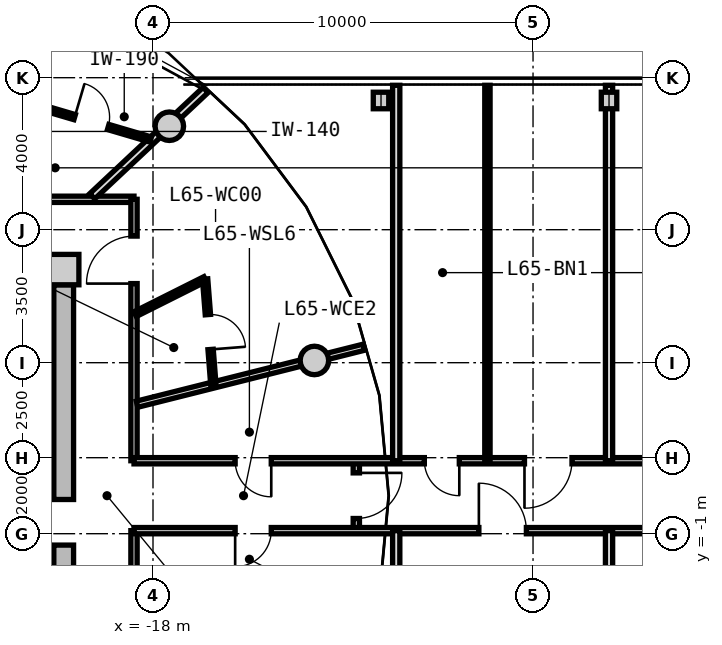
"""IFC4 building model, lengths in metres.
Left out: names, types, materials, properties, quantities, classifications, styles, units other than length and angle.
Written with IfcOpenShell. Run it as: python <this file> out.ifc"""

import sys

from ifc_helpers import new_model, si_unit, direction, frame, frame_2d, origin, origin_2d, place, context, subcontext, project, spatial, rectangle, circle, i_section, extrude, source, transform, mapped, element, fill, save


model = new_model("IFC4")
c1 = context("Model", 3, precision=1e-05, world=origin(), true_north=direction((0.0, 1.0)))
c2 = subcontext(c1, "Body", "Model", "MODEL_VIEW")
j1 = project(units=[si_unit("LENGTHUNIT", "METRE"), si_unit("PLANEANGLEUNIT", "RADIAN")], contexts=[c1])
p1 = place(None, origin())
s1 = spatial("IfcSite", under=j1, at=p1, CompositionType="ELEMENT")
p2 = place(p1, origin())
s2 = spatial("IfcBuilding", under=s1, at=p2, CompositionType="ELEMENT")
p3 = place(p2, frame((0.0, 0.0, 210.85)))
s3 = spatial("IfcBuildingStorey", under=s2, at=p3, CompositionType="ELEMENT", Elevation=210.85)
m1 = source(origin(), c2, "Body", "SweptSolid", [
    extrude(rectangle(XDim=0.8, YDim=0.8, at=origin_2d()), origin(), (0.0, 0.0, 1.0), 3.05),
])
p4 = place(p3, frame((-20.35, 5.95, 0.0), z_axis=(0.0, 0.0, 1.0), x_axis=(1.0, 0.0, 0.0)))
e1 = element("IfcColumn", 1, at=p4, inside=s3, PredefinedType="COLUMN", context=c2, shape_type="MappedRepresentation", body=[
    mapped(m1, transform((0.0, 0.0, 0.0), x_axis=(1.0, 0.0, 0.0), y_axis=(0.0, 1.0, 0.0), z_axis=(0.0, 0.0, 1.0), scale=1.0)),
])
m2 = source(origin(), c2, "Body", "SweptSolid", [
    extrude(rectangle(XDim=11.1, YDim=0.52, at=frame_2d((5.55, 0.0))), origin(), (0.0, 0.0, 1.0), 2.76),
])
p5 = place(p3, frame((-20.35, 5.55, 0.0), z_axis=(0.0, 0.0, 1.0), x_axis=(0.0, -1.0, 0.0)))
e2 = element("IfcWall", 2, at=p5, inside=s3, PredefinedType="SHEAR", context=c2, shape_type="MappedRepresentation", body=[
    mapped(m2, transform((0.0, 0.0, 0.0), x_axis=(1.0, 0.0, 0.0), y_axis=(0.0, 1.0, 0.0), z_axis=(0.0, 0.0, 1.0), scale=1.0)),
])
p6 = place(p5, frame((5.65, 0.0, 0.0)))
e3 = element("IfcOpeningElement", 3, at=p6, cuts=e2, PredefinedType="OPENING", context=c2, shape_type="SweptSolid", body=[
    extrude(rectangle(XDim=1.2, YDim=2.15, at=frame_2d((0.6, 1.075))), frame((0.0, 0.27, 0.0), z_axis=(0.0, -1.0, 0.0), x_axis=(1.0, 0.0, 0.0)), (0.0, 0.0, 1.0), 0.54),
])
p7 = place(p5, frame((9.3, 0.0, 0.0)))
e4 = element("IfcOpeningElement", 4, at=p7, cuts=e2, PredefinedType="OPENING", context=c2, shape_type="SweptSolid", body=[
    extrude(rectangle(XDim=1.0, YDim=2.1, at=frame_2d((0.5, 1.05))), frame((0.0, 0.27, 0.0), z_axis=(0.0, -1.0, 0.0), x_axis=(1.0, 0.0, 0.0)), (0.0, 0.0, 1.0), 0.54),
])
m3 = source(origin(), c2, "Body", "SweptSolid", [
    extrude(circle(Radius=0.375, at=origin_2d()), origin(), (0.0, 0.0, 1.0), 3.05),
])
for number, where, z_axis, x_axis in (
    (5, (-13.753, 3.559, 0.0), (0.0, 0.0, 1.0), (1.0, 0.0, 0.0)),
    (6, (-17.57, 9.723, 0.0), (0.0, 0.0, 1.0), (1.0, 0.0, 0.0)),
):
    element("IfcColumn", number, at=place(p3, frame(where, z_axis=z_axis, x_axis=x_axis)), inside=s3, PredefinedType="COLUMN", context=c2, shape_type="MappedRepresentation", body=[
        mapped(m3, transform((0.0, 0.0, 0.0), x_axis=(1.0, 0.0, 0.0), y_axis=(0.0, 1.0, 0.0), z_axis=(0.0, 0.0, 1.0), scale=1.0)),
    ])
m4 = source(origin(), c2, "Body", "SweptSolid", [
    extrude(i_section(OverallWidth=0.407, OverallDepth=0.435, WebThickness=0.024, FlangeThickness=0.039, FilletRadius=0.015, at=origin_2d()), origin(), (0.0, 0.0, 1.0), 3.05),
])
for number, where, z_axis, x_axis in (
    (7, (-12.0, 10.4, 0.0), (0.0, 0.0, 1.0), (1.0, 0.0, 0.0)),
    (8, (-6.0, 10.4, 0.0), (0.0, 0.0, 1.0), (1.0, 0.0, 0.0)),
):
    element("IfcColumn", number, at=place(p3, frame(where, z_axis=z_axis, x_axis=x_axis)), inside=s3, PredefinedType="COLUMN", context=c2, shape_type="MappedRepresentation", body=[
        mapped(m4, transform((0.0, 0.0, 0.0), x_axis=(1.0, 0.0, 0.0), y_axis=(0.0, 1.0, 0.0), z_axis=(0.0, 0.0, 1.0), scale=1.0)),
    ])
m5 = source(origin(), c2, "Body", "SweptSolid", [
    extrude(rectangle(XDim=8.58, YDim=0.165, at=frame_2d((4.29, 0.0))), origin(), (0.0, 0.0, 1.0), 2.745),
])
p8 = place(p3, frame((-27.08, 7.8, 0.0), z_axis=(0.0, 0.0, 1.0), x_axis=(1.0, 0.0, 0.0)))
e9 = element("IfcWall", 9, at=p8, inside=s3, PredefinedType="PARTITIONING", context=c2, shape_type="MappedRepresentation", body=[
    mapped(m5, transform((0.0, 0.0, 0.0), x_axis=(1.0, 0.0, 0.0), y_axis=(0.0, 1.0, 0.0), z_axis=(0.0, 0.0, 1.0), scale=1.0)),
])
p9 = place(p8, frame((2.18, 0.0, 0.0)))
e10 = element("IfcOpeningElement", 10, at=p9, cuts=e9, PredefinedType="OPENING", context=c2, shape_type="SweptSolid", body=[
    extrude(rectangle(XDim=1.25, YDim=2.2, at=frame_2d((0.625, 1.1))), frame((0.0, 0.093, 0.0), z_axis=(0.0, -1.0, 0.0), x_axis=(1.0, 0.0, 0.0)), (0.0, 0.0, 1.0), 0.185),
])
m6 = source(origin(), c2, "Body", "SweptSolid", [
    extrude(rectangle(XDim=6.88, YDim=0.165, at=frame_2d((3.44, 0.0))), origin(), (0.0, 0.0, 1.0), 2.745),
])
p10 = place(p3, frame((-18.5, 7.8, 0.0), z_axis=(0.0, 0.0, 1.0), x_axis=(0.0, -1.0, 0.0)))
e11 = element("IfcWall", 11, at=p10, inside=s3, PredefinedType="PARTITIONING", context=c2, shape_type="MappedRepresentation", body=[
    mapped(m6, transform((0.0, 0.0, 0.0), x_axis=(1.0, 0.0, 0.0), y_axis=(0.0, 1.0, 0.0), z_axis=(0.0, 0.0, 1.0), scale=1.0)),
])
p11 = place(p10, frame((0.968, 0.0, 0.0)))
e12 = element("IfcOpeningElement", 12, at=p11, cuts=e11, PredefinedType="OPENING", context=c2, shape_type="SweptSolid", body=[
    extrude(rectangle(XDim=1.25, YDim=2.2, at=frame_2d((0.625, 1.1))), frame((0.0, 0.093, 0.0), z_axis=(0.0, -1.0, 0.0), x_axis=(1.0, 0.0, 0.0)), (0.0, 0.0, 1.0), 0.185),
])
p12 = place(p3, frame((-18.5, -0.92, 0.0), z_axis=(0.0, 0.0, 1.0), x_axis=(0.0, -1.0, 0.0)))
e13 = element("IfcWall", 13, at=p12, inside=s3, PredefinedType="PARTITIONING", context=c2, shape_type="MappedRepresentation", body=[
    mapped(m6, transform((0.0, 0.0, 0.0), x_axis=(1.0, 0.0, 0.0), y_axis=(0.0, 1.0, 0.0), z_axis=(0.0, 0.0, 1.0), scale=1.0)),
])
p13 = place(p12, frame((3.464, 0.0, 0.0)))
e14 = element("IfcOpeningElement", 14, at=p13, cuts=e13, PredefinedType="OPENING", context=c2, shape_type="SweptSolid", body=[
    extrude(rectangle(XDim=1.25, YDim=2.2, at=frame_2d((0.625, 1.1))), frame((0.0, 0.093, 0.0), z_axis=(0.0, -1.0, 0.0), x_axis=(1.0, 0.0, 0.0)), (0.0, 0.0, 1.0), 0.185),
])
m7 = source(origin(), c2, "Body", "SweptSolid", [
    extrude(rectangle(XDim=6.157, YDim=0.165, at=frame_2d((3.079, 0.0))), origin(), (0.0, 0.0, 1.0), 2.345),
])
p14 = place(p3, frame((-18.42, 2.407, 0.0), z_axis=(0.0, 0.0, 1.0), x_axis=(0.969840867184, 0.243738984038, 0.0)))
e15 = element("IfcWall", 15, at=p14, inside=s3, PredefinedType="PARTITIONING", context=c2, shape_type="MappedRepresentation", body=[
    mapped(m7, transform((0.0, 0.0, 0.0), x_axis=(1.0, 0.0, 0.0), y_axis=(0.0, 1.0, 0.0), z_axis=(0.0, 0.0, 1.0), scale=1.0)),
])
m8 = source(origin(), c2, "Body", "SweptSolid", [
    extrude(rectangle(XDim=4.089, YDim=0.19, at=frame_2d((2.044, 0.0))), origin(), (0.0, 0.0, 1.0), 2.345),
])
p15 = place(p3, frame((-19.598, 7.88, 0.0), z_axis=(0.0, 0.0, 1.0), x_axis=(0.729401273609, 0.684086092577, 0.0)))
e16 = element("IfcWall", 16, at=p15, inside=s3, PredefinedType="PARTITIONING", context=c2, shape_type="MappedRepresentation", body=[
    mapped(m8, transform((0.0, 0.0, 0.0), x_axis=(1.0, 0.0, 0.0), y_axis=(0.0, 1.0, 0.0), z_axis=(0.0, 0.0, 1.0), scale=1.0)),
])
m9 = source(origin(), c2, "Body", "SweptSolid", [
    extrude(rectangle(XDim=2.06, YDim=0.14, at=frame_2d((1.03, 0.0))), origin(), (0.0, 0.0, 1.0), 2.745),
])
p16 = place(p3, frame((-18.47, 4.778, 0.0), z_axis=(0.0, 0.0, 1.0), x_axis=(0.893952568722, 0.448161583444, 0.0)))
e17 = element("IfcWall", 17, at=p16, inside=s3, PredefinedType="PARTITIONING", context=c2, shape_type="MappedRepresentation", body=[
    mapped(m9, transform((0.0, 0.0, 0.0), x_axis=(1.0, 0.0, 0.0), y_axis=(0.0, 1.0, 0.0), z_axis=(0.0, 0.0, 1.0), scale=1.0)),
])
m10 = source(origin(), c2, "Body", "SweptSolid", [
    extrude(rectangle(XDim=2.798, YDim=0.14, at=frame_2d((1.399, 0.0))), origin(), (0.0, 0.0, 1.0), 2.745),
])
p17 = place(p3, frame((-16.629, 5.701, 0.0), z_axis=(0.0, 0.0, 1.0), x_axis=(0.077823984089, -0.996967114553, 0.0)))
e18 = element("IfcWall", 18, at=p17, inside=s3, PredefinedType="PARTITIONING", context=c2, shape_type="MappedRepresentation", body=[
    mapped(m10, transform((0.0, 0.0, 0.0), x_axis=(1.0, 0.0, 0.0), y_axis=(0.0, 1.0, 0.0), z_axis=(0.0, 0.0, 1.0), scale=1.0)),
])
p18 = place(p17, frame((0.939, 0.0, 0.0)))
e19 = element("IfcOpeningElement", 19, at=p18, cuts=e18, PredefinedType="OPENING", context=c2, shape_type="SweptSolid", body=[
    extrude(rectangle(XDim=0.92, YDim=2.1, at=frame_2d((0.46, 1.05))), frame((0.0, 0.08, 0.0), z_axis=(0.0, -1.0, 0.0), x_axis=(1.0, 0.0, 0.0)), (0.0, 0.0, 1.0), 0.16),
])
m11 = source(origin(), c2, "Body", "SweptSolid", [
    extrude(rectangle(XDim=3.252, YDim=0.14, at=frame_2d((1.626, 0.0))), origin(), (0.0, 0.0, 1.0), 2.745),
])
p19 = place(p3, frame((-21.18, 10.291, 0.0), z_axis=(0.0, 0.0, 1.0), x_axis=(0.959294945864, -0.282406102695, 0.0)))
e20 = element("IfcWall", 20, at=p19, inside=s3, PredefinedType="PARTITIONING", context=c2, shape_type="MappedRepresentation", body=[
    mapped(m11, transform((0.0, 0.0, 0.0), x_axis=(1.0, 0.0, 0.0), y_axis=(0.0, 1.0, 0.0), z_axis=(0.0, 0.0, 1.0), scale=1.0)),
])
p20 = place(p19, frame((1.166, 0.0, 0.0)))
e21 = element("IfcOpeningElement", 21, at=p20, cuts=e20, PredefinedType="OPENING", context=c2, shape_type="SweptSolid", body=[
    extrude(rectangle(XDim=0.92, YDim=2.1, at=frame_2d((0.46, 1.05))), frame((0.0, 0.08, 0.0), z_axis=(0.0, -1.0, 0.0), x_axis=(1.0, 0.0, 0.0)), (0.0, 0.0, 1.0), 0.16),
])
m12 = source(origin(), c2, "Body", "SweptSolid", [
    extrude(rectangle(XDim=1.84, YDim=0.165, at=frame_2d((0.92, 0.0))), origin(), (0.0, 0.0, 1.0), 2.745),
])
p21 = place(p3, frame((-12.65, -0.92, 0.0), z_axis=(0.0, 0.0, 1.0), x_axis=(0.0, 1.0, 0.0)))
e22 = element("IfcWall", 22, at=p21, inside=s3, PredefinedType="PARTITIONING", context=c2, shape_type="MappedRepresentation", body=[
    mapped(m12, transform((0.0, 0.0, 0.0), x_axis=(1.0, 0.0, 0.0), y_axis=(0.0, 1.0, 0.0), z_axis=(0.0, 0.0, 1.0), scale=1.0)),
])
p22 = place(p21, frame((0.32, 0.0, 0.0)))
e23 = element("IfcOpeningElement", 23, at=p22, cuts=e22, PredefinedType="OPENING", context=c2, shape_type="SweptSolid", body=[
    extrude(rectangle(XDim=1.2, YDim=2.15, at=frame_2d((0.6, 1.075))), frame((0.0, 0.093, 0.0), z_axis=(0.0, -1.0, 0.0), x_axis=(1.0, 0.0, 0.0)), (0.0, 0.0, 1.0), 0.185),
])
m13 = source(origin(), c2, "Body", "SweptSolid", [
    extrude(rectangle(XDim=37.0, YDim=0.165, at=frame_2d((18.5, 0.0))), origin(), (0.0, 0.0, 1.0), 2.745),
])
p23 = place(p3, frame((-18.5, -0.92, 0.0), z_axis=(0.0, 0.0, 1.0), x_axis=(1.0, 0.0, 0.0)))
e24 = element("IfcWall", 24, at=p23, inside=s3, PredefinedType="PARTITIONING", context=c2, shape_type="MappedRepresentation", body=[
    mapped(m13, transform((0.0, 0.0, 0.0), x_axis=(1.0, 0.0, 0.0), y_axis=(0.0, 1.0, 0.0), z_axis=(0.0, 0.0, 1.0), scale=1.0)),
])
p24 = place(p23, frame((2.662, 0.0, 0.0)))
e25 = element("IfcOpeningElement", 25, at=p24, cuts=e24, PredefinedType="OPENING", context=c2, shape_type="SweptSolid", body=[
    extrude(rectangle(XDim=0.95, YDim=2.1, at=frame_2d((0.475, 1.05))), frame((0.0, 0.093, 0.0), z_axis=(0.0, -1.0, 0.0), x_axis=(1.0, 0.0, 0.0)), (0.0, 0.0, 1.0), 0.185),
])
p25 = place(p23, frame((33.388, 0.0, 0.0)))
e26 = element("IfcOpeningElement", 26, at=p25, cuts=e24, PredefinedType="OPENING", context=c2, shape_type="SweptSolid", body=[
    extrude(rectangle(XDim=0.95, YDim=2.1, at=frame_2d((0.475, 1.05))), frame((0.0, 0.093, 0.0), z_axis=(0.0, -1.0, 0.0), x_axis=(1.0, 0.0, 0.0)), (0.0, 0.0, 1.0), 0.185),
])
p26 = place(p23, frame((9.075, 0.0, 0.0)))
e27 = element("IfcOpeningElement", 27, at=p26, cuts=e24, PredefinedType="OPENING", context=c2, shape_type="SweptSolid", body=[
    extrude(rectangle(XDim=1.25, YDim=2.2, at=frame_2d((0.625, 1.1))), frame((0.0, 0.093, 0.0), z_axis=(0.0, -1.0, 0.0), x_axis=(1.0, 0.0, 0.0)), (0.0, 0.0, 1.0), 0.185),
])
p27 = place(p23, frame((14.875, 0.0, 0.0)))
e28 = element("IfcOpeningElement", 28, at=p27, cuts=e24, PredefinedType="OPENING", context=c2, shape_type="SweptSolid", body=[
    extrude(rectangle(XDim=1.25, YDim=2.2, at=frame_2d((0.625, 1.1))), frame((0.0, 0.093, 0.0), z_axis=(0.0, -1.0, 0.0), x_axis=(1.0, 0.0, 0.0)), (0.0, 0.0, 1.0), 0.185),
])
p28 = place(p23, frame((20.875, 0.0, 0.0)))
e29 = element("IfcOpeningElement", 29, at=p28, cuts=e24, PredefinedType="OPENING", context=c2, shape_type="SweptSolid", body=[
    extrude(rectangle(XDim=1.25, YDim=2.2, at=frame_2d((0.625, 1.1))), frame((0.0, 0.093, 0.0), z_axis=(0.0, -1.0, 0.0), x_axis=(1.0, 0.0, 0.0)), (0.0, 0.0, 1.0), 0.185),
])
p29 = place(p23, frame((26.675, 0.0, 0.0)))
e30 = element("IfcOpeningElement", 30, at=p29, cuts=e24, PredefinedType="OPENING", context=c2, shape_type="SweptSolid", body=[
    extrude(rectangle(XDim=1.25, YDim=2.2, at=frame_2d((0.625, 1.1))), frame((0.0, 0.093, 0.0), z_axis=(0.0, -1.0, 0.0), x_axis=(1.0, 0.0, 0.0)), (0.0, 0.0, 1.0), 0.185),
])
p30 = place(p3, frame((-18.5, 0.92, 0.0), z_axis=(0.0, 0.0, 1.0), x_axis=(1.0, 0.0, 0.0)))
e31 = element("IfcWall", 31, at=p30, inside=s3, PredefinedType="PARTITIONING", context=c2, shape_type="MappedRepresentation", body=[
    mapped(m13, transform((0.0, 0.0, 0.0), x_axis=(1.0, 0.0, 0.0), y_axis=(0.0, 1.0, 0.0), z_axis=(0.0, 0.0, 1.0), scale=1.0)),
])
p31 = place(p30, frame((2.662, 0.0, 0.0)))
e32 = element("IfcOpeningElement", 32, at=p31, cuts=e31, PredefinedType="OPENING", context=c2, shape_type="SweptSolid", body=[
    extrude(rectangle(XDim=0.95, YDim=2.1, at=frame_2d((0.475, 1.05))), frame((0.0, 0.093, 0.0), z_axis=(0.0, -1.0, 0.0), x_axis=(1.0, 0.0, 0.0)), (0.0, 0.0, 1.0), 0.185),
])
p32 = place(p30, frame((33.388, 0.0, 0.0)))
e33 = element("IfcOpeningElement", 33, at=p32, cuts=e31, PredefinedType="OPENING", context=c2, shape_type="SweptSolid", body=[
    extrude(rectangle(XDim=0.95, YDim=2.1, at=frame_2d((0.475, 1.05))), frame((0.0, 0.093, 0.0), z_axis=(0.0, -1.0, 0.0), x_axis=(1.0, 0.0, 0.0)), (0.0, 0.0, 1.0), 0.185),
])
p33 = place(p30, frame((7.64, 0.0, 0.0)))
e34 = element("IfcOpeningElement", 34, at=p33, cuts=e31, PredefinedType="OPENING", context=c2, shape_type="SweptSolid", body=[
    extrude(rectangle(XDim=0.92, YDim=2.1, at=frame_2d((0.46, 1.05))), frame((0.0, 0.093, 0.0), z_axis=(0.0, -1.0, 0.0), x_axis=(1.0, 0.0, 0.0)), (0.0, 0.0, 1.0), 0.185),
])
p34 = place(p30, frame((10.275, 0.0, 0.0)))
e35 = element("IfcOpeningElement", 35, at=p34, cuts=e31, PredefinedType="OPENING", context=c2, shape_type="SweptSolid", body=[
    extrude(rectangle(XDim=1.25, YDim=2.2, at=frame_2d((0.625, 1.1))), frame((0.0, 0.093, 0.0), z_axis=(0.0, -1.0, 0.0), x_axis=(1.0, 0.0, 0.0)), (0.0, 0.0, 1.0), 0.185),
])
p35 = place(p30, frame((14.875, 0.0, 0.0)))
e36 = element("IfcOpeningElement", 36, at=p35, cuts=e31, PredefinedType="OPENING", context=c2, shape_type="SweptSolid", body=[
    extrude(rectangle(XDim=1.25, YDim=2.2, at=frame_2d((0.625, 1.1))), frame((0.0, 0.093, 0.0), z_axis=(0.0, -1.0, 0.0), x_axis=(1.0, 0.0, 0.0)), (0.0, 0.0, 1.0), 0.185),
])
p36 = place(p30, frame((20.875, 0.0, 0.0)))
e37 = element("IfcOpeningElement", 37, at=p36, cuts=e31, PredefinedType="OPENING", context=c2, shape_type="SweptSolid", body=[
    extrude(rectangle(XDim=1.25, YDim=2.2, at=frame_2d((0.625, 1.1))), frame((0.0, 0.093, 0.0), z_axis=(0.0, -1.0, 0.0), x_axis=(1.0, 0.0, 0.0)), (0.0, 0.0, 1.0), 0.185),
])
p37 = place(p30, frame((26.675, 0.0, 0.0)))
e38 = element("IfcOpeningElement", 38, at=p37, cuts=e31, PredefinedType="OPENING", context=c2, shape_type="SweptSolid", body=[
    extrude(rectangle(XDim=1.25, YDim=2.2, at=frame_2d((0.625, 1.1))), frame((0.0, 0.093, 0.0), z_axis=(0.0, -1.0, 0.0), x_axis=(1.0, 0.0, 0.0)), (0.0, 0.0, 1.0), 0.185),
])
m14 = source(origin(), c2, "Body", "SweptSolid", [
    extrude(rectangle(XDim=9.88, YDim=0.19, at=frame_2d((4.94, 0.0))), origin(), (0.0, 0.0, 1.0), 2.745),
])
for number, where, z_axis, x_axis in (
    (39, (-11.6, -10.8, 0.0), (0.0, 0.0, 1.0), (0.0, 1.0, 0.0)),
    (40, (-11.6, 0.92, 0.0), (0.0, 0.0, 1.0), (0.0, 1.0, 0.0)),
):
    element("IfcWall", number, at=place(p3, frame(where, z_axis=z_axis, x_axis=x_axis)), inside=s3, PredefinedType="PARTITIONING", context=c2, shape_type="MappedRepresentation", body=[
        mapped(m14, transform((0.0, 0.0, 0.0), x_axis=(1.0, 0.0, 0.0), y_axis=(0.0, 1.0, 0.0), z_axis=(0.0, 0.0, 1.0), scale=1.0)),
    ])
m15 = source(origin(), c2, "Body", "SweptSolid", [
    extrude(rectangle(XDim=9.88, YDim=0.19, at=frame_2d((4.94, 0.0))), origin(), (0.0, 0.0, 1.0), 2.045),
])
for number, where, z_axis, x_axis in (
    (41, (-6.0, -10.8, 0.0), (0.0, 0.0, 1.0), (0.0, 1.0, 0.0)),
    (42, (-6.0, 0.92, 0.0), (0.0, 0.0, 1.0), (0.0, 1.0, 0.0)),
):
    element("IfcWall", number, at=place(p3, frame(where, z_axis=z_axis, x_axis=x_axis)), inside=s3, PredefinedType="PARTITIONING", context=c2, shape_type="MappedRepresentation", body=[
        mapped(m15, transform((0.0, 0.0, 0.0), x_axis=(1.0, 0.0, 0.0), y_axis=(0.0, 1.0, 0.0), z_axis=(0.0, 0.0, 1.0), scale=1.0)),
    ])
m16 = source(origin(), c2, "Body", "SweptSolid", [
    extrude(rectangle(XDim=9.88, YDim=0.14, at=frame_2d((4.94, 0.0))), origin(), (0.0, 0.0, 1.0), 2.745),
])
p38 = place(p3, frame((-9.2, 0.92, 0.0), z_axis=(0.0, 0.0, 1.0), x_axis=(0.0, 1.0, 0.0)))
e43 = element("IfcWall", 43, at=p38, inside=s3, PredefinedType="PARTITIONING", context=c2, shape_type="MappedRepresentation", body=[
    mapped(m16, transform((0.0, 0.0, 0.0), x_axis=(1.0, 0.0, 0.0), y_axis=(0.0, 1.0, 0.0), z_axis=(0.0, 0.0, 1.0), scale=1.0)),
])
m17 = source(origin(), c2, "Body", "SweptSolid", [
    extrude(rectangle(XDim=1.2, YDim=2.15, at=frame_2d((0.6, 1.075))), frame((0.0, 0.025, 0.0), z_axis=(0.0, -1.0, 0.0), x_axis=(1.0, 0.0, 0.0)), (0.0, 0.0, 1.0), 0.05),
])
p39 = place(p6, frame((1.2, 0.0, 0.0), z_axis=(0.0, 0.0, 1.0), x_axis=(-1.0, 0.0, 0.0)))
e44 = element("IfcDoor", 44, at=p39, inside=s3, OperationType="SINGLE_SWING_RIGHT", PredefinedType="DOOR", context=c2, shape_type="MappedRepresentation", body=[
    mapped(m17, transform((0.0, 0.0, 0.0), x_axis=(1.0, 0.0, 0.0), y_axis=(0.0, 1.0, 0.0), z_axis=(0.0, 0.0, 1.0), scale=1.0)),
])
fill(e3, e44)
m18 = source(origin(), c2, "Body", "SweptSolid", [
    extrude(rectangle(XDim=0.95, YDim=2.1, at=frame_2d((0.475, 1.05))), frame((0.0, 0.025, 0.0), z_axis=(0.0, -1.0, 0.0), x_axis=(1.0, 0.0, 0.0)), (0.0, 0.0, 1.0), 0.05),
])
p40 = place(p24, frame((0.95, 0.0, 0.0), z_axis=(0.0, 0.0, 1.0), x_axis=(-1.0, 0.0, 0.0)))
e45 = element("IfcDoor", 45, at=p40, inside=s3, OperationType="SINGLE_SWING_RIGHT", PredefinedType="DOOR", context=c2, shape_type="MappedRepresentation", body=[
    mapped(m18, transform((0.0, 0.0, 0.0), x_axis=(1.0, 0.0, 0.0), y_axis=(0.0, 1.0, 0.0), z_axis=(0.0, 0.0, 1.0), scale=1.0)),
])
fill(e25, e45)
p41 = place(p31, frame((0.95, 0.0, 0.0), z_axis=(0.0, 0.0, 1.0), x_axis=(-1.0, 0.0, 0.0)))
e46 = element("IfcDoor", 46, at=p41, inside=s3, OperationType="SINGLE_SWING_LEFT", PredefinedType="DOOR", context=c2, shape_type="MappedRepresentation", body=[
    mapped(m18, transform((0.0, 0.0, 0.0), x_axis=(1.0, 0.0, 0.0), y_axis=(0.0, 1.0, 0.0), z_axis=(0.0, 0.0, 1.0), scale=1.0)),
])
fill(e32, e46)
m19 = source(origin(), c2, "Body", "SweptSolid", [
    extrude(rectangle(XDim=1.25, YDim=2.2, at=frame_2d((0.625, 1.1))), frame((0.0, 0.025, 0.0), z_axis=(0.0, -1.0, 0.0), x_axis=(1.0, 0.0, 0.0)), (0.0, 0.0, 1.0), 0.05),
])
p42 = place(p11, frame((1.25, 0.0, 0.0), z_axis=(0.0, 0.0, 1.0), x_axis=(-1.0, 0.0, 0.0)))
e47 = element("IfcDoor", 47, at=p42, inside=s3, OperationType="SINGLE_SWING_LEFT", PredefinedType="DOOR", context=c2, shape_type="MappedRepresentation", body=[
    mapped(m19, transform((0.0, 0.0, 0.0), x_axis=(1.0, 0.0, 0.0), y_axis=(0.0, 1.0, 0.0), z_axis=(0.0, 0.0, 1.0), scale=1.0)),
])
fill(e12, e47)
m20 = source(origin(), c2, "Body", "SweptSolid", [
    extrude(rectangle(XDim=0.92, YDim=2.1, at=frame_2d((0.46, 1.05))), frame((0.0, 0.025, 0.0), z_axis=(0.0, -1.0, 0.0), x_axis=(1.0, 0.0, 0.0)), (0.0, 0.0, 1.0), 0.05),
])
p43 = place(p18, origin())
e48 = element("IfcDoor", 48, at=p43, inside=s3, OperationType="SINGLE_SWING_RIGHT", PredefinedType="DOOR", context=c2, shape_type="MappedRepresentation", body=[
    mapped(m20, transform((0.0, 0.0, 0.0), x_axis=(1.0, 0.0, 0.0), y_axis=(0.0, 1.0, 0.0), z_axis=(0.0, 0.0, 1.0), scale=1.0)),
])
fill(e19, e48)
p44 = place(p20, origin())
e49 = element("IfcDoor", 49, at=p44, inside=s3, OperationType="SINGLE_SWING_LEFT", PredefinedType="DOOR", context=c2, shape_type="MappedRepresentation", body=[
    mapped(m20, transform((0.0, 0.0, 0.0), x_axis=(1.0, 0.0, 0.0), y_axis=(0.0, 1.0, 0.0), z_axis=(0.0, 0.0, 1.0), scale=1.0)),
])
fill(e21, e49)
p45 = place(p22, frame((1.2, 0.0, 0.0), z_axis=(0.0, 0.0, 1.0), x_axis=(-1.0, 0.0, 0.0)))
e50 = element("IfcDoor", 50, at=p45, inside=s3, OperationType="SINGLE_SWING_LEFT", PredefinedType="DOOR", context=c2, shape_type="MappedRepresentation", body=[
    mapped(m17, transform((0.0, 0.0, 0.0), x_axis=(1.0, 0.0, 0.0), y_axis=(0.0, 1.0, 0.0), z_axis=(0.0, 0.0, 1.0), scale=1.0)),
])
fill(e23, e50)
p46 = place(p26, origin())
e51 = element("IfcDoor", 51, at=p46, inside=s3, OperationType="SINGLE_SWING_LEFT", PredefinedType="DOOR", context=c2, shape_type="MappedRepresentation", body=[
    mapped(m19, transform((0.0, 0.0, 0.0), x_axis=(1.0, 0.0, 0.0), y_axis=(0.0, 1.0, 0.0), z_axis=(0.0, 0.0, 1.0), scale=1.0)),
])
fill(e27, e51)
p47 = place(p33, frame((0.92, 0.0, 0.0), z_axis=(0.0, 0.0, 1.0), x_axis=(-1.0, 0.0, 0.0)))
e52 = element("IfcDoor", 52, at=p47, inside=s3, OperationType="SINGLE_SWING_LEFT", PredefinedType="DOOR", context=c2, shape_type="MappedRepresentation", body=[
    mapped(m20, transform((0.0, 0.0, 0.0), x_axis=(1.0, 0.0, 0.0), y_axis=(0.0, 1.0, 0.0), z_axis=(0.0, 0.0, 1.0), scale=1.0)),
])
fill(e34, e52)
p48 = place(p34, frame((1.25, 0.0, 0.0), z_axis=(0.0, 0.0, 1.0), x_axis=(-1.0, 0.0, 0.0)))
e53 = element("IfcDoor", 53, at=p48, inside=s3, OperationType="SINGLE_SWING_RIGHT", PredefinedType="DOOR", context=c2, shape_type="MappedRepresentation", body=[
    mapped(m19, transform((0.0, 0.0, 0.0), x_axis=(1.0, 0.0, 0.0), y_axis=(0.0, 1.0, 0.0), z_axis=(0.0, 0.0, 1.0), scale=1.0)),
])
fill(e35, e53)
save(model, sys.argv[1])
